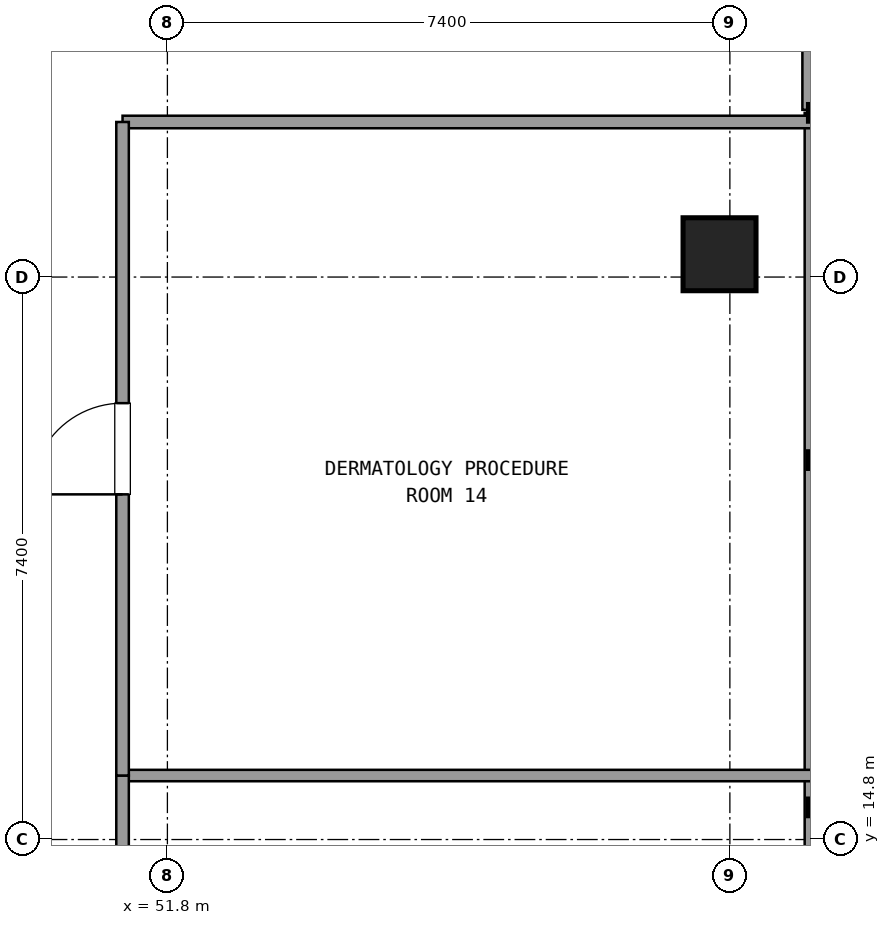
"""IFC4 building model, lengths in metres.
Left out: names, types, materials, properties, quantities, classifications, styles, units other than length and angle.
Written with IfcOpenShell. Run it as: python <this file> out.ifc"""

import sys

from ifc_helpers import new_model, si_unit, direction, frame, frame_2d, origin, origin_2d, place, context, subcontext, project, spatial, rectangle, extrude, element, fill, save


model = new_model("IFC4")
c1 = context("Model", 3, precision=1e-05, world=origin(), true_north=direction((0.0, 1.0)))
c2 = subcontext(c1, "Body", "Model", "MODEL_VIEW")
j1 = project(units=[si_unit("LENGTHUNIT", "METRE"), si_unit("PLANEANGLEUNIT", "RADIAN")], contexts=[c1])
p1 = place(None, origin())
s1 = spatial("IfcSite", under=j1, at=p1, CompositionType="ELEMENT")
p2 = place(p1, origin())
s2 = spatial("IfcBuilding", under=s1, at=p2, CompositionType="ELEMENT")
p3 = place(p2, frame((0.0, 0.0, 145.62)))
s3 = spatial("IfcBuildingStorey", under=s2, at=p3, CompositionType="ELEMENT", Elevation=145.62)
p4 = place(p3, frame((59.064, 22.5, 0.0), z_axis=(0.0, 0.0, 1.0), x_axis=(1.0, 0.0, 0.0)))
e1 = element("IfcColumn", 1, at=p4, inside=s3, PredefinedType="COLUMN", context=c2, shape_type="SweptSolid", body=[
    extrude(rectangle(XDim=0.96, YDim=0.96, at=origin_2d()), origin(), (0.0, 0.0, 1.0), 3.6),
])
p5 = place(p3, frame((60.304, 24.4, 0.0), z_axis=(0.0, 0.0, 1.0), x_axis=(0.0, 1.0, 0.0)))
e2 = element("IfcWall", 2, at=p5, inside=s3, PredefinedType="SOLIDWALL", context=c2, shape_type="SweptSolid", body=[
    extrude(rectangle(XDim=3.0, YDim=0.3, at=frame_2d((1.5, 0.0))), origin(), (0.0, 0.0, 1.0), 2.67),
])
p6 = place(p5, frame((0.9, 0.0, 0.0)))
e3 = element("IfcOpeningElement", 3, at=p6, cuts=e2, PredefinedType="OPENING", context=c2, shape_type="SweptSolid", body=[
    extrude(rectangle(XDim=1.2, YDim=2.2, at=frame_2d((0.6, 1.1))), frame((0.0, 0.16, 0.0), z_axis=(0.0, -1.0, 0.0), x_axis=(1.0, 0.0, 0.0)), (0.0, 0.0, 1.0), 0.32),
])
p7 = place(p3, frame((60.304, 10.655, 0.0), z_axis=(0.0, 0.0, 1.0), x_axis=(0.0, 1.0, 0.0)))
e4 = element("IfcWall", 4, at=p7, inside=s3, PredefinedType="SOLIDWALL", context=c2, shape_type="SweptSolid", body=[
    extrude(rectangle(XDim=13.705, YDim=0.24, at=frame_2d((6.853, 0.0))), origin(), (0.0, 0.0, 1.0), 0.85),
])
p8 = place(p3, frame((51.21, 24.24, 0.0), z_axis=(0.0, 0.0, 1.0), x_axis=(1.0, 0.0, 0.0)))
e5 = element("IfcWall", 5, at=p8, inside=s3, PredefinedType="PARTITIONING", context=c2, shape_type="SweptSolid", body=[
    extrude(rectangle(XDim=9.074, YDim=0.165, at=frame_2d((4.537, 0.0))), origin(), (0.0, 0.0, 1.0), 2.61),
])
p9 = place(p3, frame((51.21, 15.642, 0.0), z_axis=(0.0, 0.0, 1.0), x_axis=(1.0, 0.0, 0.0)))
e6 = element("IfcWall", 6, at=p9, inside=s3, PredefinedType="PARTITIONING", context=c2, shape_type="SweptSolid", body=[
    extrude(rectangle(XDim=9.074, YDim=0.15, at=frame_2d((4.537, 0.0))), origin(), (0.0, 0.0, 1.0), 2.61),
])
p10 = place(p3, frame((51.21, 4.7, 0.0), z_axis=(0.0, 0.0, 1.0), x_axis=(0.0, 1.0, 0.0)))
e7 = element("IfcWall", 7, at=p10, inside=s3, PredefinedType="PARTITIONING", context=c2, shape_type="SweptSolid", body=[
    extrude(rectangle(XDim=10.942, YDim=0.165, at=frame_2d((5.471, 0.0))), origin(), (0.0, 0.0, 1.0), 2.61),
])
p11 = place(p10, frame((4.871, 0.0, 0.0)))
e8 = element("IfcOpeningElement", 8, at=p11, cuts=e7, PredefinedType="OPENING", context=c2, shape_type="SweptSolid", body=[
    extrude(rectangle(XDim=1.2, YDim=2.15, at=frame_2d((0.6, 1.075))), frame((0.0, 0.093, 0.0), z_axis=(0.0, -1.0, 0.0), x_axis=(1.0, 0.0, 0.0)), (0.0, 0.0, 1.0), 0.185),
])
p12 = place(p3, frame((51.21, 15.642, 0.0), z_axis=(0.0, 0.0, 1.0), x_axis=(0.0, 1.0, 0.0)))
e9 = element("IfcWall", 9, at=p12, inside=s3, PredefinedType="PARTITIONING", context=c2, shape_type="SweptSolid", body=[
    extrude(rectangle(XDim=8.598, YDim=0.165, at=frame_2d((4.299, 0.0))), origin(), (0.0, 0.0, 1.0), 2.61),
])
p13 = place(p12, frame((3.699, 0.0, 0.0)))
e10 = element("IfcOpeningElement", 10, at=p13, cuts=e9, PredefinedType="OPENING", context=c2, shape_type="SweptSolid", body=[
    extrude(rectangle(XDim=1.2, YDim=2.15, at=frame_2d((0.6, 1.075))), frame((0.0, 0.093, 0.0), z_axis=(0.0, -1.0, 0.0), x_axis=(1.0, 0.0, 0.0)), (0.0, 0.0, 1.0), 0.185),
])
p14 = place(p13, origin())
e11 = element("IfcDoor", 11, at=p14, inside=s3, OperationType="SINGLE_SWING_LEFT", PredefinedType="DOOR", context=c2, shape_type="SweptSolid", body=[
    extrude(rectangle(XDim=1.2, YDim=2.15, at=frame_2d((0.6, 1.075))), frame((0.0, 0.025, 0.0), z_axis=(0.0, -1.0, 0.0), x_axis=(1.0, 0.0, 0.0)), (0.0, 0.0, 1.0), 0.05),
])
fill(e10, e11)
save(model, sys.argv[1])
